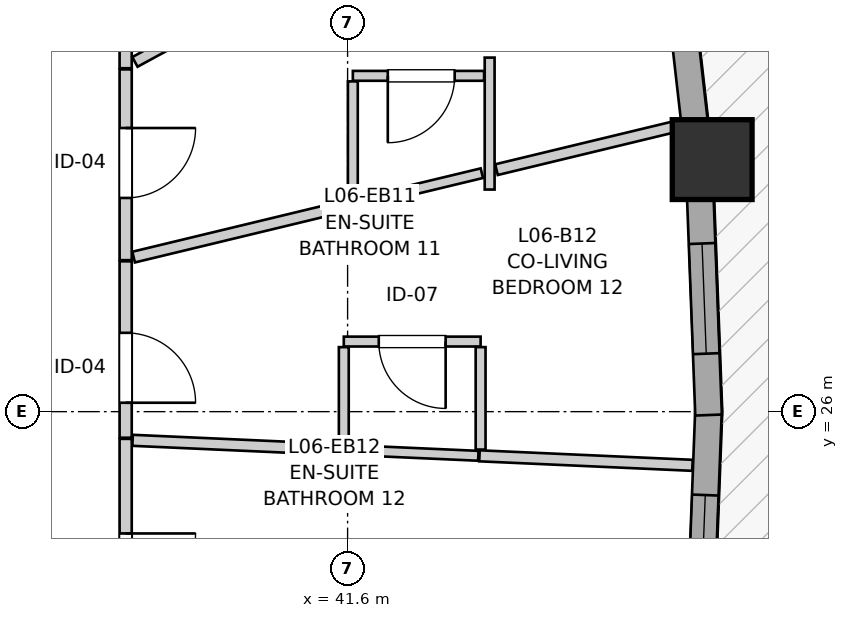
"""IFC4 building model, lengths in metres.
Left out: names, types, materials, properties, quantities, classifications, styles, units other than length and angle.
Written with IfcOpenShell. Run it as: python <this file> out.ifc"""

import sys

from ifc_helpers import new_model, si_unit, direction, frame, frame_2d, origin, origin_2d, place, context, subcontext, project, spatial, rectangle, extrude, source, transform, mapped, element, fill, save


model = new_model("IFC4")
c1 = context("Model", 3, precision=1e-05, world=origin(), true_north=direction((0.0, 1.0)))
c2 = subcontext(c1, "Body", "Model", "MODEL_VIEW")
j1 = project(units=[si_unit("LENGTHUNIT", "METRE"), si_unit("PLANEANGLEUNIT", "RADIAN")], contexts=[c1])
p1 = place(None, origin())
s1 = spatial("IfcSite", under=j1, at=p1, CompositionType="ELEMENT")
p2 = place(p1, origin())
s2 = spatial("IfcBuilding", under=s1, at=p2, CompositionType="ELEMENT")
p3 = place(p2, frame((0.0, 0.0, 23.8)))
s3 = spatial("IfcBuildingStorey", under=s2, at=p3, CompositionType="ELEMENT", Elevation=23.8)
m1 = source(origin(), c2, "Body", "SweptSolid", [
    extrude(rectangle(XDim=1.05, YDim=1.05, at=origin_2d()), origin(), (0.0, 0.0, 1.0), 2.935),
])
p4 = place(p3, frame((46.397, 29.316, 0.0), z_axis=(0.0, 0.0, 1.0), x_axis=(1.0, 0.0, 0.0)))
e1 = element("IfcColumn", 1, at=p4, inside=s3, PredefinedType="COLUMN", context=c2, shape_type="MappedRepresentation", body=[
    mapped(m1, transform((0.0, 0.0, 0.0), x_axis=(1.0, 0.0, 0.0), y_axis=(0.0, 1.0, 0.0), z_axis=(0.0, 0.0, 1.0), scale=1.0)),
])
p5 = place(p3, frame((46.223, 22.711, 0.0), z_axis=(0.0, 0.0, 1.0), x_axis=(0.037977854684, 0.999278581054, 0.0)))
e2 = element("IfcWall", 2, at=p5, inside=s3, PredefinedType="SOLIDWALL", context=c2, shape_type="SweptSolid", body=[
    extrude(rectangle(XDim=3.336, YDim=0.35, at=frame_2d((1.668, 0.0))), origin(), (0.0, 0.0, 1.0), 2.415),
])
p6 = place(p5, frame((0.444, 0.0, 0.82)))
e3 = element("IfcOpeningElement", 3, at=p6, cuts=e2, PredefinedType="OPENING", context=c2, shape_type="SweptSolid", body=[
    extrude(rectangle(XDim=1.75, YDim=1.3, at=frame_2d((0.875, 0.65))), frame((0.0, 0.185, 0.0), z_axis=(0.0, -1.0, 0.0), x_axis=(1.0, 0.0, 0.0)), (0.0, 0.0, 1.0), 0.37),
])
p7 = place(p3, frame((46.349, 25.955, 0.0), z_axis=(0.0, 0.0, 1.0), x_axis=(-0.038022046735, 0.999276900545, 0.0)))
e4 = element("IfcWall", 4, at=p7, inside=s3, PredefinedType="SOLIDWALL", context=c2, shape_type="SweptSolid", body=[
    extrude(rectangle(XDim=3.056, YDim=0.35, at=frame_2d((1.528, 0.0))), origin(), (0.0, 0.0, 1.0), 2.415),
])
p8 = place(p7, frame((0.808, 0.0, 0.82)))
e5 = element("IfcOpeningElement", 5, at=p8, cuts=e4, PredefinedType="OPENING", context=c2, shape_type="SweptSolid", body=[
    extrude(rectangle(XDim=1.45, YDim=1.25, at=frame_2d((0.725, 0.625))), frame((0.0, 0.185, 0.0), z_axis=(0.0, -1.0, 0.0), x_axis=(1.0, 0.0, 0.0)), (0.0, 0.0, 1.0), 0.37),
])
p9 = place(p3, frame((46.189, 29.594, 0.0), z_axis=(0.0, 0.0, 1.0), x_axis=(-0.113201797404, 0.99357201705, 0.0)))
e6 = element("IfcWall", 6, at=p9, inside=s3, PredefinedType="SOLIDWALL", context=c2, shape_type="SweptSolid", body=[
    extrude(rectangle(XDim=3.075, YDim=0.35, at=frame_2d((1.538, 0.0))), origin(), (0.0, 0.0, 1.0), 2.415),
])
p10 = place(p9, frame((1.345, 0.0, 0.82)))
e7 = element("IfcOpeningElement", 7, at=p10, cuts=e6, PredefinedType="OPENING", context=c2, shape_type="SweptSolid", body=[
    extrude(rectangle(XDim=0.58, YDim=1.35, at=frame_2d((0.29, 0.675))), frame((0.0, 0.185, 0.0), z_axis=(0.0, -1.0, 0.0), x_axis=(1.0, 0.0, 0.0)), (0.0, 0.0, 1.0), 0.37),
])
p11 = place(p3, frame((38.68, 25.642, 0.0), z_axis=(0.0, 0.0, 1.0), x_axis=(0.0, -1.0, 0.0)))
e8 = element("IfcWall", 8, at=p11, inside=s3, PredefinedType="PARTITIONING", context=c2, shape_type="SweptSolid", body=[
    extrude(rectangle(XDim=3.363, YDim=0.16, at=frame_2d((1.682, 0.0))), origin(), (0.0, 0.0, 1.0), 2.935),
])
p12 = place(p11, frame((1.244, 0.0, 0.0)))
e9 = element("IfcOpeningElement", 9, at=p12, cuts=e8, PredefinedType="OPENING", context=c2, shape_type="SweptSolid", body=[
    extrude(rectangle(XDim=0.92, YDim=2.1, at=frame_2d((0.46, 1.05))), frame((0.0, 0.09, 0.0), z_axis=(0.0, -1.0, 0.0), x_axis=(1.0, 0.0, 0.0)), (0.0, 0.0, 1.0), 0.18),
])
p13 = place(p3, frame((38.68, 33.735, 0.0), z_axis=(0.0, 0.0, 1.0), x_axis=(0.0, -1.0, 0.0)))
e10 = element("IfcWall", 10, at=p13, inside=s3, PredefinedType="PARTITIONING", context=c2, shape_type="SweptSolid", body=[
    extrude(rectangle(XDim=3.217, YDim=0.16, at=frame_2d((1.608, 0.0))), origin(), (0.0, 0.0, 1.0), 2.935),
])
p14 = place(p13, frame((0.22, 0.0, 0.0)))
e11 = element("IfcOpeningElement", 11, at=p14, cuts=e10, PredefinedType="OPENING", context=c2, shape_type="SweptSolid", body=[
    extrude(rectangle(XDim=0.92, YDim=2.1, at=frame_2d((0.46, 1.05))), frame((0.0, 0.09, 0.0), z_axis=(0.0, -1.0, 0.0), x_axis=(1.0, 0.0, 0.0)), (0.0, 0.0, 1.0), 0.18),
])
p15 = place(p3, frame((38.68, 30.503, 0.0), z_axis=(0.0, 0.0, 1.0), x_axis=(0.0, -1.0, 0.0)))
e12 = element("IfcWall", 12, at=p15, inside=s3, PredefinedType="PARTITIONING", context=c2, shape_type="SweptSolid", body=[
    extrude(rectangle(XDim=2.51, YDim=0.16, at=frame_2d((1.255, 0.0))), origin(), (0.0, 0.0, 1.0), 2.935),
])
p16 = place(p15, frame((0.771, 0.0, 0.0)))
e13 = element("IfcOpeningElement", 13, at=p16, cuts=e12, PredefinedType="OPENING", context=c2, shape_type="SweptSolid", body=[
    extrude(rectangle(XDim=0.92, YDim=2.1, at=frame_2d((0.46, 1.05))), frame((0.0, 0.09, 0.0), z_axis=(0.0, -1.0, 0.0), x_axis=(1.0, 0.0, 0.0)), (0.0, 0.0, 1.0), 0.18),
])
p17 = place(p3, frame((38.68, 27.978, 0.0), z_axis=(0.0, 0.0, 1.0), x_axis=(0.0, -1.0, 0.0)))
e14 = element("IfcWall", 14, at=p17, inside=s3, PredefinedType="PARTITIONING", context=c2, shape_type="SweptSolid", body=[
    extrude(rectangle(XDim=2.321, YDim=0.16, at=frame_2d((1.161, 0.0))), origin(), (0.0, 0.0, 1.0), 2.935),
])
p18 = place(p17, frame((0.941, 0.0, 0.0)))
e15 = element("IfcOpeningElement", 15, at=p18, cuts=e14, PredefinedType="OPENING", context=c2, shape_type="SweptSolid", body=[
    extrude(rectangle(XDim=0.92, YDim=2.1, at=frame_2d((0.46, 1.05))), frame((0.0, 0.09, 0.0), z_axis=(0.0, -1.0, 0.0), x_axis=(1.0, 0.0, 0.0)), (0.0, 0.0, 1.0), 0.18),
])
p19 = place(p3, frame((43.396, 30.418, 0.0), z_axis=(0.0, 0.0, 1.0), x_axis=(-1.0, 0.0, 0.0)))
e16 = element("IfcWall", 16, at=p19, inside=s3, PredefinedType="PARTITIONING", context=c2, shape_type="SweptSolid", body=[
    extrude(rectangle(XDim=1.727, YDim=0.13, at=frame_2d((0.864, 0.0))), origin(), (0.0, 0.0, 1.0), 2.935),
])
p20 = place(p19, frame((0.387, 0.0, 0.0)))
e17 = element("IfcOpeningElement", 17, at=p20, cuts=e16, PredefinedType="OPENING", context=c2, shape_type="SweptSolid", body=[
    extrude(rectangle(XDim=0.88, YDim=2.05, at=frame_2d((0.44, 1.025))), frame((0.0, 0.075, 0.0), z_axis=(0.0, -1.0, 0.0), x_axis=(1.0, 0.0, 0.0)), (0.0, 0.0, 1.0), 0.15),
])
p21 = place(p3, frame((43.35, 26.922, 0.0), z_axis=(0.0, 0.0, 1.0), x_axis=(-1.0, 0.0, 0.0)))
e18 = element("IfcWall", 18, at=p21, inside=s3, PredefinedType="PARTITIONING", context=c2, shape_type="SweptSolid", body=[
    extrude(rectangle(XDim=1.8, YDim=0.13, at=frame_2d((0.9, 0.0))), origin(), (0.0, 0.0, 1.0), 2.935),
])
p22 = place(p21, frame((0.46, 0.0, 0.0)))
e19 = element("IfcOpeningElement", 19, at=p22, cuts=e18, PredefinedType="OPENING", context=c2, shape_type="SweptSolid", body=[
    extrude(rectangle(XDim=0.88, YDim=2.05, at=frame_2d((0.44, 1.025))), frame((0.0, 0.075, 0.0), z_axis=(0.0, -1.0, 0.0), x_axis=(1.0, 0.0, 0.0)), (0.0, 0.0, 1.0), 0.15),
])
p23 = place(p3, frame((38.802, 30.601, 0.0), z_axis=(0.0, 0.0, 1.0), x_axis=(0.878335610987, 0.478044510973, 0.0)))
e20 = element("IfcWall", 20, at=p23, inside=s3, PredefinedType="PARTITIONING", context=c2, shape_type="SweptSolid", body=[
    extrude(rectangle(XDim=3.602, YDim=0.145, at=frame_2d((1.801, 0.0))), origin(), (0.0, 0.0, 1.0), 2.103),
])
p24 = place(p3, frame((38.785, 28.033, 0.0), z_axis=(0.0, 0.0, 1.0), x_axis=(0.972108739033, 0.234530593943, 0.0)))
e21 = element("IfcWall", 21, at=p24, inside=s3, PredefinedType="PARTITIONING", context=c2, shape_type="SweptSolid", body=[
    extrude(rectangle(XDim=2.967, YDim=0.145, at=frame_2d((1.483, 0.0))), origin(), (0.0, 0.0, 1.0), 2.935),
])
p25 = place(p3, frame((38.771, 25.623, 0.0), z_axis=(0.0, 0.0, 1.0), x_axis=(0.999004404192, -0.044611662199, 0.0)))
e22 = element("IfcWall", 22, at=p25, inside=s3, PredefinedType="PARTITIONING", context=c2, shape_type="SweptSolid", body=[
    extrude(rectangle(XDim=2.796, YDim=0.145, at=frame_2d((1.398, 0.0))), origin(), (0.0, 0.0, 1.0), 2.935),
])
p26 = place(p3, frame((43.335, 25.419, 0.0), z_axis=(0.0, 0.0, 1.0), x_axis=(0.999002708223, -0.04464962444, 0.0)))
e23 = element("IfcWall", 23, at=p26, inside=s3, PredefinedType="PARTITIONING", context=c2, shape_type="SweptSolid", body=[
    extrude(rectangle(XDim=2.805, YDim=0.145, at=frame_2d((1.402, 0.0))), origin(), (0.0, 0.0, 1.0), 2.935),
])
p27 = place(p3, frame((43.559, 29.184, 0.0), z_axis=(0.0, 0.0, 1.0), x_axis=(0.972124665715, 0.23446456941, 0.0)))
e24 = element("IfcWall", 24, at=p27, inside=s3, PredefinedType="PARTITIONING", context=c2, shape_type="SweptSolid", body=[
    extrude(rectangle(XDim=2.487, YDim=0.145, at=frame_2d((1.243, 0.0))), origin(), (0.0, 0.0, 1.0), 2.935),
])
p28 = place(p3, frame((41.684, 28.732, 0.0), z_axis=(0.0, 0.0, 1.0), x_axis=(0.972269386076, 0.233863722924, 0.0)))
e25 = element("IfcWall", 25, at=p28, inside=s3, PredefinedType="PARTITIONING", context=c2, shape_type="SweptSolid", body=[
    extrude(rectangle(XDim=1.731, YDim=0.13, at=frame_2d((0.865, 0.0))), origin(), (0.0, 0.0, 1.0), 2.935),
])
p29 = place(p3, frame((41.58, 25.497, 0.0), z_axis=(0.0, 0.0, 1.0), x_axis=(0.998993531001, -0.04485448715, 0.0)))
e26 = element("IfcWall", 26, at=p29, inside=s3, PredefinedType="PARTITIONING", context=c2, shape_type="SweptSolid", body=[
    extrude(rectangle(XDim=1.742, YDim=0.13, at=frame_2d((0.871, 0.0))), origin(), (0.0, 0.0, 1.0), 2.935),
])
p30 = place(p3, frame((41.669, 28.827, 0.0), z_axis=(0.0, 0.0, 1.0), x_axis=(0.0, 1.0, 0.0)))
e27 = element("IfcWall", 27, at=p30, inside=s3, PredefinedType="PARTITIONING", context=c2, shape_type="SweptSolid", body=[
    extrude(rectangle(XDim=1.518, YDim=0.13, at=frame_2d((0.759, 0.0))), origin(), (0.0, 0.0, 1.0), 2.935),
])
p31 = place(p3, frame((43.35, 25.501, 0.0), z_axis=(0.0, 0.0, 1.0), x_axis=(0.0, 1.0, 0.0)))
e28 = element("IfcWall", 28, at=p31, inside=s3, PredefinedType="PARTITIONING", context=c2, shape_type="SweptSolid", body=[
    extrude(rectangle(XDim=1.348, YDim=0.13, at=frame_2d((0.674, 0.0))), origin(), (0.0, 0.0, 1.0), 2.503),
])
p32 = place(p3, frame((41.55, 25.583, 0.0), z_axis=(0.0, 0.0, 1.0), x_axis=(0.0, 1.0, 0.0)))
e29 = element("IfcWall", 29, at=p32, inside=s3, PredefinedType="PARTITIONING", context=c2, shape_type="SweptSolid", body=[
    extrude(rectangle(XDim=1.267, YDim=0.13, at=frame_2d((0.633, 0.0))), origin(), (0.0, 0.0, 1.0), 2.935),
])
p33 = place(p3, frame((43.469, 28.922, 0.0), z_axis=(0.0, 0.0, 1.0), x_axis=(0.0, 1.0, 0.0)))
e30 = element("IfcWall", 30, at=p33, inside=s3, PredefinedType="PARTITIONING", context=c2, shape_type="SweptSolid", body=[
    extrude(rectangle(XDim=1.736, YDim=0.13, at=frame_2d((0.868, 0.0))), origin(), (0.0, 0.0, 1.0), 2.935),
])
m2 = source(origin(), c2, "Body", "SweptSolid", [
    extrude(rectangle(XDim=1.75, YDim=1.3, at=frame_2d((0.875, 0.65))), frame((0.0, 0.03, 0.0), z_axis=(0.0, -1.0, 0.0), x_axis=(1.0, 0.0, 0.0)), (0.0, 0.0, 1.0), 0.06),
])
p34 = place(p6, origin())
e31 = element("IfcWindow", 31, at=p34, inside=s3, PartitioningType="SINGLE_PANEL", PredefinedType="WINDOW", context=c2, shape_type="MappedRepresentation", body=[
    mapped(m2, transform((0.0, 0.0, 0.0), x_axis=(1.0, 0.0, 0.0), y_axis=(0.0, 1.0, 0.0), z_axis=(0.0, 0.0, 1.0), scale=1.0)),
])
fill(e3, e31)
m3 = source(origin(), c2, "Body", "SweptSolid", [
    extrude(rectangle(XDim=1.45, YDim=1.25, at=frame_2d((0.725, 0.625))), frame((0.0, 0.03, 0.0), z_axis=(0.0, -1.0, 0.0), x_axis=(1.0, 0.0, 0.0)), (0.0, 0.0, 1.0), 0.06),
])
p35 = place(p8, origin())
e32 = element("IfcWindow", 32, at=p35, inside=s3, PartitioningType="SINGLE_PANEL", PredefinedType="WINDOW", context=c2, shape_type="MappedRepresentation", body=[
    mapped(m3, transform((0.0, 0.0, 0.0), x_axis=(1.0, 0.0, 0.0), y_axis=(0.0, 1.0, 0.0), z_axis=(0.0, 0.0, 1.0), scale=1.0)),
])
fill(e5, e32)
m4 = source(origin(), c2, "Body", "SweptSolid", [
    extrude(rectangle(XDim=0.92, YDim=2.1, at=frame_2d((0.46, 1.05))), frame((0.0, 0.025, 0.0), z_axis=(0.0, -1.0, 0.0), x_axis=(1.0, 0.0, 0.0)), (0.0, 0.0, 1.0), 0.05),
])
p36 = place(p12, origin())
e33 = element("IfcDoor", 33, at=p36, inside=s3, OperationType="SINGLE_SWING_LEFT", PredefinedType="DOOR", context=c2, shape_type="MappedRepresentation", body=[
    mapped(m4, transform((0.0, 0.0, 0.0), x_axis=(1.0, 0.0, 0.0), y_axis=(0.0, 1.0, 0.0), z_axis=(0.0, 0.0, 1.0), scale=1.0)),
])
fill(e9, e33)
p37 = place(p16, origin())
e34 = element("IfcDoor", 34, at=p37, inside=s3, OperationType="SINGLE_SWING_LEFT", PredefinedType="DOOR", context=c2, shape_type="MappedRepresentation", body=[
    mapped(m4, transform((0.0, 0.0, 0.0), x_axis=(1.0, 0.0, 0.0), y_axis=(0.0, 1.0, 0.0), z_axis=(0.0, 0.0, 1.0), scale=1.0)),
])
fill(e13, e34)
p38 = place(p18, origin())
e35 = element("IfcDoor", 35, at=p38, inside=s3, OperationType="SINGLE_SWING_RIGHT", PredefinedType="DOOR", context=c2, shape_type="MappedRepresentation", body=[
    mapped(m4, transform((0.0, 0.0, 0.0), x_axis=(1.0, 0.0, 0.0), y_axis=(0.0, 1.0, 0.0), z_axis=(0.0, 0.0, 1.0), scale=1.0)),
])
fill(e15, e35)
m5 = source(origin(), c2, "Body", "SweptSolid", [
    extrude(rectangle(XDim=0.88, YDim=2.05, at=frame_2d((0.44, 1.025))), frame((0.0, 0.025, 0.0), z_axis=(0.0, -1.0, 0.0), x_axis=(1.0, 0.0, 0.0)), (0.0, 0.0, 1.0), 0.05),
])
p39 = place(p20, origin())
e36 = element("IfcDoor", 36, at=p39, inside=s3, OperationType="SINGLE_SWING_RIGHT", PredefinedType="DOOR", context=c2, shape_type="MappedRepresentation", body=[
    mapped(m5, transform((0.0, 0.0, 0.0), x_axis=(1.0, 0.0, 0.0), y_axis=(0.0, 1.0, 0.0), z_axis=(0.0, 0.0, 1.0), scale=1.0)),
])
fill(e17, e36)
p40 = place(p22, origin())
e37 = element("IfcDoor", 37, at=p40, inside=s3, OperationType="SINGLE_SWING_LEFT", PredefinedType="DOOR", context=c2, shape_type="MappedRepresentation", body=[
    mapped(m5, transform((0.0, 0.0, 0.0), x_axis=(1.0, 0.0, 0.0), y_axis=(0.0, 1.0, 0.0), z_axis=(0.0, 0.0, 1.0), scale=1.0)),
])
fill(e19, e37)
save(model, sys.argv[1])
